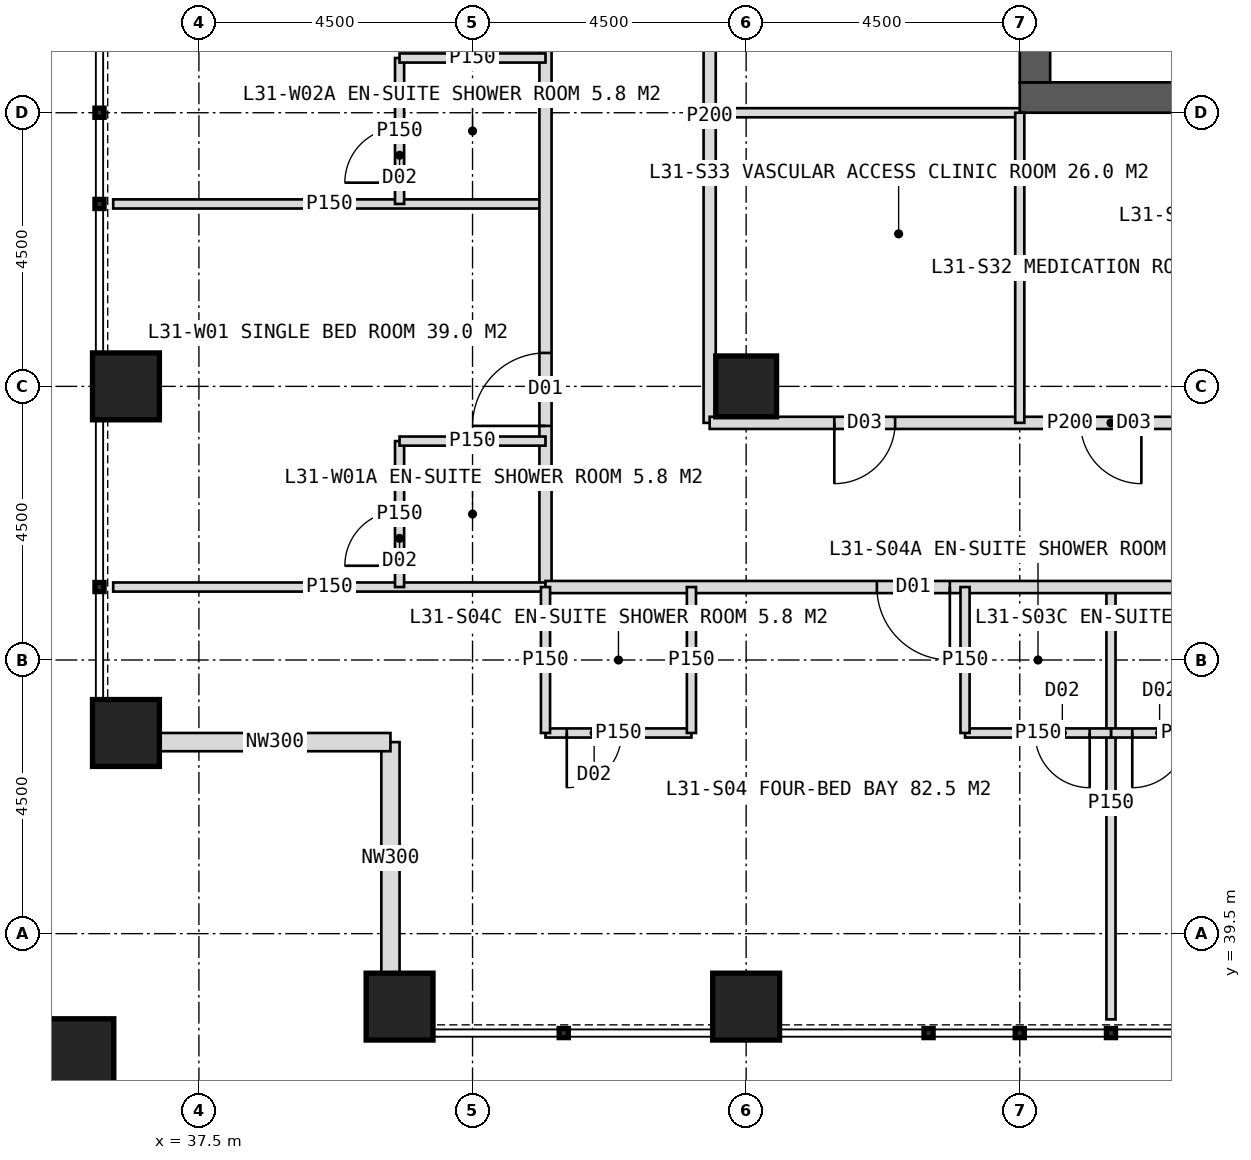
"""IFC4 building model, lengths in metres.
Left out: names, types, materials, properties, quantities, classifications, styles, units other than length and angle.
Written with IfcOpenShell. Run it as: python <this file> out.ifc"""

import sys

from ifc_helpers import new_model, si_unit, direction, frame, frame_2d, origin, origin_2d, place, context, subcontext, project, spatial, rectangle, hollow_rectangle, extrude, element, fill, save


model = new_model("IFC4")
c1 = context("Model", 3, precision=1e-05, world=origin(), true_north=direction((0.0, 1.0)))
c2 = subcontext(c1, "Body", "Model", "MODEL_VIEW")
j1 = project(units=[si_unit("LENGTHUNIT", "METRE"), si_unit("PLANEANGLEUNIT", "RADIAN")], contexts=[c1])
p1 = place(None, origin())
s1 = spatial("IfcSite", under=j1, at=p1, CompositionType="ELEMENT")
p2 = place(p1, origin())
s2 = spatial("IfcBuilding", under=s1, at=p2, CompositionType="ELEMENT")
p3 = place(p2, frame((0.0, 0.0, 132.0)))
s3 = spatial("IfcBuildingStorey", under=s2, at=p3, CompositionType="ELEMENT", Elevation=132.0)
p4 = place(p3, frame((51.0, 53.25, 0.0), z_axis=(0.0, 0.0, 1.0), x_axis=(1.0, 0.0, 0.0)))
e1 = element("IfcWall", 1, at=p4, inside=s3, PredefinedType="SHEAR", context=c2, shape_type="SweptSolid", body=[
    extrude(rectangle(XDim=18.0, YDim=0.5, at=frame_2d((9.0, 0.0))), origin(), (0.0, 0.0, 1.0), 4.0),
])
p5 = place(p4, frame((8.1, 0.0, 0.0)))
e2 = element("IfcOpeningElement", 2, at=p5, cuts=e1, PredefinedType="OPENING", context=c2, shape_type="SweptSolid", body=[
    extrude(rectangle(XDim=1.8, YDim=2.2, at=frame_2d((0.9, 1.1))), frame((0.0, 0.26, 0.0), z_axis=(0.0, -1.0, 0.0), x_axis=(1.0, 0.0, 0.0)), (0.0, 0.0, 1.0), 0.52),
])
p6 = place(p3, frame((51.25, 53.5, 0.0), z_axis=(0.0, 0.0, 1.0), x_axis=(0.0, 1.0, 0.0)))
e3 = element("IfcWall", 3, at=p6, inside=s3, PredefinedType="SHEAR", context=c2, shape_type="SweptSolid", body=[
    extrude(rectangle(XDim=17.0, YDim=0.5, at=frame_2d((8.5, 0.0))), origin(), (0.0, 0.0, 1.0), 4.0),
])
p7 = place(p6, frame((6.0, 0.0, 0.0)))
e4 = element("IfcOpeningElement", 4, at=p7, cuts=e3, PredefinedType="OPENING", context=c2, shape_type="SweptSolid", body=[
    extrude(rectangle(XDim=1.5, YDim=2.2, at=frame_2d((0.75, 1.1))), frame((0.0, 0.26, 0.0), z_axis=(0.0, -1.0, 0.0), x_axis=(1.0, 0.0, 0.0)), (0.0, 0.0, 1.0), 0.52),
])
p8 = place(p3, frame((46.5, 48.5, 0.0), z_axis=(0.0, 0.0, 1.0), x_axis=(1.0, 0.0, 0.0)))
e5 = element("IfcColumn", 5, at=p8, inside=s3, PredefinedType="COLUMN", context=c2, shape_type="SweptSolid", body=[
    extrude(hollow_rectangle(XDim=1.0, YDim=1.0, WallThickness=0.1, at=origin_2d()), origin(), (0.0, 0.0, 1.0), 4.0),
])
for number, where, z_axis, x_axis in (
    (6, (40.8, 38.3, 0.0), (0.0, 0.0, 1.0), (1.0, 0.0, 0.0)),
    (7, (36.3, 42.8, 0.0), (0.0, 0.0, 1.0), (1.0, 0.0, 0.0)),
    (8, (46.5, 38.3, 0.0), (0.0, 0.0, 1.0), (1.0, 0.0, 0.0)),
    (9, (36.3, 48.5, 0.0), (0.0, 0.0, 1.0), (1.0, 0.0, 0.0)),
):
    element("IfcColumn", number, at=place(p3, frame(where, z_axis=z_axis, x_axis=x_axis)), inside=s3, PredefinedType="COLUMN", context=c2, shape_type="SweptSolid", body=[
        extrude(hollow_rectangle(XDim=1.1, YDim=1.1, WallThickness=0.1, at=origin_2d()), origin(), (0.0, 0.0, 1.0), 4.0),
    ])
p9 = place(p3, frame((35.4, 37.4, 0.0), z_axis=(0.0, 0.0, 1.0), x_axis=(1.0, 0.0, 0.0)))
e10 = element("IfcColumn", 10, at=p9, inside=s3, PredefinedType="COLUMN", context=c2, shape_type="SweptSolid", body=[
    extrude(hollow_rectangle(XDim=1.4, YDim=1.4, WallThickness=0.08, at=origin_2d()), origin(), (0.0, 0.0, 1.0), 4.0),
])
for number, where, z_axis, x_axis in (
    (11, (40.65, 38.85, 0.0), (0.0, 0.0, 1.0), (0.0, 1.0, 0.0)),
    (12, (40.65, 42.65, 0.0), (0.0, 0.0, 1.0), (-1.0, 0.0, 0.0)),
):
    element("IfcWall", number, at=place(p3, frame(where, z_axis=z_axis, x_axis=x_axis)), inside=s3, PredefinedType="ELEMENTEDWALL", context=c2, shape_type="SweptSolid", body=[
        extrude(rectangle(XDim=3.8, YDim=0.3, at=frame_2d((1.9, 0.0))), origin(), (0.0, 0.0, 1.0), 4.0),
    ])
p10 = place(p3, frame((43.2, 51.5, 0.0), z_axis=(0.0, 0.0, 1.0), x_axis=(-1.0, 0.0, 0.0)))
e13 = element("IfcWall", 13, at=p10, inside=s3, PredefinedType="PARTITIONING", context=c2, shape_type="SweptSolid", body=[
    extrude(rectangle(XDim=7.11, YDim=0.15, at=frame_2d((3.555, 0.0))), origin(), (0.0, 0.0, 1.0), 3.75),
])
p11 = place(p3, frame((43.2, 45.2, 0.0), z_axis=(0.0, 0.0, 1.0), x_axis=(0.0, 1.0, 0.0)))
e14 = element("IfcWall", 14, at=p11, inside=s3, PredefinedType="PARTITIONING", context=c2, shape_type="SweptSolid", body=[
    extrude(rectangle(XDim=33.6, YDim=0.2, at=frame_2d((16.8, 0.0))), origin(), (0.0, 0.0, 1.0), 3.75),
])
p12 = place(p11, frame((2.65, 0.0, 0.0)))
e15 = element("IfcOpeningElement", 15, at=p12, cuts=e14, PredefinedType="OPENING", context=c2, shape_type="SweptSolid", body=[
    extrude(rectangle(XDim=1.2, YDim=2.2, at=frame_2d((0.6, 1.1))), frame((0.0, 0.11, 0.0), z_axis=(0.0, -1.0, 0.0), x_axis=(1.0, 0.0, 0.0)), (0.0, 0.0, 1.0), 0.22),
])
p13 = place(p11, frame((8.95, 0.0, 0.0)))
e16 = element("IfcOpeningElement", 16, at=p13, cuts=e14, PredefinedType="OPENING", context=c2, shape_type="SweptSolid", body=[
    extrude(rectangle(XDim=1.2, YDim=2.2, at=frame_2d((0.6, 1.1))), frame((0.0, 0.11, 0.0), z_axis=(0.0, -1.0, 0.0), x_axis=(1.0, 0.0, 0.0)), (0.0, 0.0, 1.0), 0.22),
])
p14 = place(p11, frame((19.45, 0.0, 0.0)))
e17 = element("IfcOpeningElement", 17, at=p14, cuts=e14, PredefinedType="OPENING", context=c2, shape_type="SweptSolid", body=[
    extrude(rectangle(XDim=1.2, YDim=2.2, at=frame_2d((0.6, 1.1))), frame((0.0, 0.11, 0.0), z_axis=(0.0, -1.0, 0.0), x_axis=(1.0, 0.0, 0.0)), (0.0, 0.0, 1.0), 0.22),
])
p15 = place(p11, frame((28.45, 0.0, 0.0)))
e18 = element("IfcOpeningElement", 18, at=p15, cuts=e14, PredefinedType="OPENING", context=c2, shape_type="SweptSolid", body=[
    extrude(rectangle(XDim=1.2, YDim=2.2, at=frame_2d((0.6, 1.1))), frame((0.0, 0.11, 0.0), z_axis=(0.0, -1.0, 0.0), x_axis=(1.0, 0.0, 0.0)), (0.0, 0.0, 1.0), 0.22),
])
p16 = place(p3, frame((43.2, 45.2, 0.0), z_axis=(0.0, 0.0, 1.0), x_axis=(-1.0, 0.0, 0.0)))
e19 = element("IfcWall", 19, at=p16, inside=s3, PredefinedType="PARTITIONING", context=c2, shape_type="SweptSolid", body=[
    extrude(rectangle(XDim=7.11, YDim=0.15, at=frame_2d((3.555, 0.0))), origin(), (0.0, 0.0, 1.0), 3.75),
])
p17 = place(p3, frame((40.8, 45.2, 0.0), z_axis=(0.0, 0.0, 1.0), x_axis=(0.0, 1.0, 0.0)))
e20 = element("IfcWall", 20, at=p17, inside=s3, PredefinedType="PARTITIONING", context=c2, shape_type="SweptSolid", body=[
    extrude(rectangle(XDim=2.4, YDim=0.15, at=frame_2d((1.2, 0.0))), origin(), (0.0, 0.0, 1.0), 2.997),
])
p18 = place(p17, frame((0.35, 0.0, 0.0)))
e21 = element("IfcOpeningElement", 21, at=p18, cuts=e20, PredefinedType="OPENING", context=c2, shape_type="SweptSolid", body=[
    extrude(rectangle(XDim=0.9, YDim=2.1, at=frame_2d((0.45, 1.05))), frame((0.0, 0.085, 0.0), z_axis=(0.0, -1.0, 0.0), x_axis=(1.0, 0.0, 0.0)), (0.0, 0.0, 1.0), 0.17),
])
p19 = place(p3, frame((43.2, 47.6, 0.0), z_axis=(0.0, 0.0, 1.0), x_axis=(-1.0, 0.0, 0.0)))
e22 = element("IfcWall", 22, at=p19, inside=s3, PredefinedType="PARTITIONING", context=c2, shape_type="SweptSolid", body=[
    extrude(rectangle(XDim=2.4, YDim=0.15, at=frame_2d((1.2, 0.0))), origin(), (0.0, 0.0, 1.0), 3.75),
])
p20 = place(p3, frame((40.8, 51.5, 0.0), z_axis=(0.0, 0.0, 1.0), x_axis=(0.0, 1.0, 0.0)))
e23 = element("IfcWall", 23, at=p20, inside=s3, PredefinedType="PARTITIONING", context=c2, shape_type="SweptSolid", body=[
    extrude(rectangle(XDim=2.4, YDim=0.15, at=frame_2d((1.2, 0.0))), origin(), (0.0, 0.0, 1.0), 3.75),
])
p21 = place(p20, frame((0.35, 0.0, 0.0)))
e24 = element("IfcOpeningElement", 24, at=p21, cuts=e23, PredefinedType="OPENING", context=c2, shape_type="SweptSolid", body=[
    extrude(rectangle(XDim=0.9, YDim=2.1, at=frame_2d((0.45, 1.05))), frame((0.0, 0.085, 0.0), z_axis=(0.0, -1.0, 0.0), x_axis=(1.0, 0.0, 0.0)), (0.0, 0.0, 1.0), 0.17),
])
p22 = place(p3, frame((43.2, 53.9, 0.0), z_axis=(0.0, 0.0, 1.0), x_axis=(-1.0, 0.0, 0.0)))
e25 = element("IfcWall", 25, at=p22, inside=s3, PredefinedType="PARTITIONING", context=c2, shape_type="SweptSolid", body=[
    extrude(rectangle(XDim=2.4, YDim=0.15, at=frame_2d((1.2, 0.0))), origin(), (0.0, 0.0, 1.0), 3.75),
])
p23 = place(p3, frame((51.0, 53.0, 0.0), z_axis=(0.0, 0.0, 1.0), x_axis=(-1.0, 0.0, 0.0)))
e26 = element("IfcWall", 26, at=p23, inside=s3, PredefinedType="PARTITIONING", context=c2, shape_type="SweptSolid", body=[
    extrude(rectangle(XDim=5.1, YDim=0.15, at=frame_2d((2.55, 0.0))), origin(), (0.0, 0.0, 1.0), 3.75),
])
p24 = place(p3, frame((45.9, 47.9, 0.0), z_axis=(0.0, 0.0, 1.0), x_axis=(0.0, 1.0, 0.0)))
e27 = element("IfcWall", 27, at=p24, inside=s3, PredefinedType="PARTITIONING", context=c2, shape_type="SweptSolid", body=[
    extrude(rectangle(XDim=10.1, YDim=0.2, at=frame_2d((5.05, 0.0))), origin(), (0.0, 0.0, 1.0), 3.75),
])
p25 = place(p24, frame((7.1, 0.0, 0.0)))
e28 = element("IfcOpeningElement", 28, at=p25, cuts=e27, PredefinedType="OPENING", context=c2, shape_type="SweptSolid", body=[
    extrude(rectangle(XDim=1.0, YDim=2.1, at=frame_2d((0.5, 1.05))), frame((0.0, 0.11, 0.0), z_axis=(0.0, -1.0, 0.0), x_axis=(1.0, 0.0, 0.0)), (0.0, 0.0, 1.0), 0.22),
])
p26 = place(p3, frame((52.5, 45.2, 0.0), z_axis=(0.0, 0.0, 1.0), x_axis=(0.0, -1.0, 0.0)))
e29 = element("IfcWall", 29, at=p26, inside=s3, PredefinedType="PARTITIONING", context=c2, shape_type="SweptSolid", body=[
    extrude(rectangle(XDim=7.11, YDim=0.15, at=frame_2d((3.555, 0.0))), origin(), (0.0, 0.0, 1.0), 3.75),
])
p27 = place(p3, frame((76.8, 45.2, 0.0), z_axis=(0.0, 0.0, 1.0), x_axis=(-1.0, 0.0, 0.0)))
e30 = element("IfcWall", 30, at=p27, inside=s3, PredefinedType="PARTITIONING", context=c2, shape_type="SweptSolid", body=[
    extrude(rectangle(XDim=33.6, YDim=0.2, at=frame_2d((16.8, 0.0))), origin(), (0.0, 0.0, 1.0), 3.75),
])
p28 = place(p27, frame((2.65, 0.0, 0.0)))
e31 = element("IfcOpeningElement", 31, at=p28, cuts=e30, PredefinedType="OPENING", context=c2, shape_type="SweptSolid", body=[
    extrude(rectangle(XDim=1.2, YDim=2.2, at=frame_2d((0.6, 1.1))), frame((0.0, 0.11, 0.0), z_axis=(0.0, -1.0, 0.0), x_axis=(1.0, 0.0, 0.0)), (0.0, 0.0, 1.0), 0.22),
])
p29 = place(p27, frame((11.05, 0.0, 0.0)))
e32 = element("IfcOpeningElement", 32, at=p29, cuts=e30, PredefinedType="OPENING", context=c2, shape_type="SweptSolid", body=[
    extrude(rectangle(XDim=1.2, YDim=2.2, at=frame_2d((0.6, 1.1))), frame((0.0, 0.11, 0.0), z_axis=(0.0, -1.0, 0.0), x_axis=(1.0, 0.0, 0.0)), (0.0, 0.0, 1.0), 0.22),
])
p30 = place(p27, frame((17.95, 0.0, 0.0)))
e33 = element("IfcOpeningElement", 33, at=p30, cuts=e30, PredefinedType="OPENING", context=c2, shape_type="SweptSolid", body=[
    extrude(rectangle(XDim=1.2, YDim=2.2, at=frame_2d((0.6, 1.1))), frame((0.0, 0.11, 0.0), z_axis=(0.0, -1.0, 0.0), x_axis=(1.0, 0.0, 0.0)), (0.0, 0.0, 1.0), 0.22),
])
p31 = place(p27, frame((26.95, 0.0, 0.0)))
e34 = element("IfcOpeningElement", 34, at=p31, cuts=e30, PredefinedType="OPENING", context=c2, shape_type="SweptSolid", body=[
    extrude(rectangle(XDim=1.2, YDim=2.2, at=frame_2d((0.6, 1.1))), frame((0.0, 0.11, 0.0), z_axis=(0.0, -1.0, 0.0), x_axis=(1.0, 0.0, 0.0)), (0.0, 0.0, 1.0), 0.22),
])
p32 = place(p3, frame((54.9, 42.8, 0.0), z_axis=(0.0, 0.0, 1.0), x_axis=(-1.0, 0.0, 0.0)))
e35 = element("IfcWall", 35, at=p32, inside=s3, PredefinedType="PARTITIONING", context=c2, shape_type="SweptSolid", body=[
    extrude(rectangle(XDim=2.4, YDim=0.15, at=frame_2d((1.2, 0.0))), origin(), (0.0, 0.0, 1.0), 3.75),
])
p33 = place(p32, frame((1.15, 0.0, 0.0)))
e36 = element("IfcOpeningElement", 36, at=p33, cuts=e35, PredefinedType="OPENING", context=c2, shape_type="SweptSolid", body=[
    extrude(rectangle(XDim=0.9, YDim=2.1, at=frame_2d((0.45, 1.05))), frame((0.0, 0.085, 0.0), z_axis=(0.0, -1.0, 0.0), x_axis=(1.0, 0.0, 0.0)), (0.0, 0.0, 1.0), 0.17),
])
p34 = place(p3, frame((52.5, 42.8, 0.0), z_axis=(0.0, 0.0, 1.0), x_axis=(-1.0, 0.0, 0.0)))
e37 = element("IfcWall", 37, at=p34, inside=s3, PredefinedType="PARTITIONING", context=c2, shape_type="SweptSolid", body=[
    extrude(rectangle(XDim=2.4, YDim=0.15, at=frame_2d((1.2, 0.0))), origin(), (0.0, 0.0, 1.0), 3.75),
])
p35 = place(p34, frame((0.35, 0.0, 0.0)))
e38 = element("IfcOpeningElement", 38, at=p35, cuts=e37, PredefinedType="OPENING", context=c2, shape_type="SweptSolid", body=[
    extrude(rectangle(XDim=0.9, YDim=2.1, at=frame_2d((0.45, 1.05))), frame((0.0, 0.085, 0.0), z_axis=(0.0, -1.0, 0.0), x_axis=(1.0, 0.0, 0.0)), (0.0, 0.0, 1.0), 0.17),
])
p36 = place(p3, frame((50.1, 45.2, 0.0), z_axis=(0.0, 0.0, 1.0), x_axis=(0.0, -1.0, 0.0)))
e39 = element("IfcWall", 39, at=p36, inside=s3, PredefinedType="PARTITIONING", context=c2, shape_type="SweptSolid", body=[
    extrude(rectangle(XDim=2.4, YDim=0.15, at=frame_2d((1.2, 0.0))), origin(), (0.0, 0.0, 1.0), 3.75),
])
p37 = place(p3, frame((45.6, 42.8, 0.0), z_axis=(0.0, 0.0, 1.0), x_axis=(-1.0, 0.0, 0.0)))
e40 = element("IfcWall", 40, at=p37, inside=s3, PredefinedType="PARTITIONING", context=c2, shape_type="SweptSolid", body=[
    extrude(rectangle(XDim=2.4, YDim=0.15, at=frame_2d((1.2, 0.0))), origin(), (0.0, 0.0, 1.0), 2.997),
])
p38 = place(p37, frame((1.15, 0.0, 0.0)))
e41 = element("IfcOpeningElement", 41, at=p38, cuts=e40, PredefinedType="OPENING", context=c2, shape_type="SweptSolid", body=[
    extrude(rectangle(XDim=0.9, YDim=2.1, at=frame_2d((0.45, 1.05))), frame((0.0, 0.085, 0.0), z_axis=(0.0, -1.0, 0.0), x_axis=(1.0, 0.0, 0.0)), (0.0, 0.0, 1.0), 0.17),
])
for number, where, z_axis, x_axis in (
    (42, (45.6, 45.2, 0.0), (0.0, 0.0, 1.0), (0.0, -1.0, 0.0)),
    (43, (43.2, 45.2, 0.0), (0.0, 0.0, 1.0), (0.0, -1.0, 0.0)),
):
    element("IfcWall", number, at=place(p3, frame(where, z_axis=z_axis, x_axis=x_axis)), inside=s3, PredefinedType="PARTITIONING", context=c2, shape_type="SweptSolid", body=[
        extrude(rectangle(XDim=2.4, YDim=0.15, at=frame_2d((1.2, 0.0))), origin(), (0.0, 0.0, 1.0), 3.75),
    ])
p39 = place(p3, frame((57.75, 47.9, 0.0), z_axis=(0.0, 0.0, 1.0), x_axis=(-1.0, 0.0, 0.0)))
e44 = element("IfcWall", 44, at=p39, inside=s3, PredefinedType="PARTITIONING", context=c2, shape_type="SweptSolid", body=[
    extrude(rectangle(XDim=11.85, YDim=0.2, at=frame_2d((5.925, 0.0))), origin(), (0.0, 0.0, 1.0), 3.75),
])
p40 = place(p39, frame((0.325, 0.0, 0.0)))
e45 = element("IfcOpeningElement", 45, at=p40, cuts=e44, PredefinedType="OPENING", context=c2, shape_type="SweptSolid", body=[
    extrude(rectangle(XDim=1.0, YDim=2.1, at=frame_2d((0.5, 1.05))), frame((0.0, 0.11, 0.0), z_axis=(0.0, -1.0, 0.0), x_axis=(1.0, 0.0, 0.0)), (0.0, 0.0, 1.0), 0.22),
])
p41 = place(p39, frame((4.75, 0.0, 0.0)))
e46 = element("IfcOpeningElement", 46, at=p41, cuts=e44, PredefinedType="OPENING", context=c2, shape_type="SweptSolid", body=[
    extrude(rectangle(XDim=1.0, YDim=2.1, at=frame_2d((0.5, 1.05))), frame((0.0, 0.11, 0.0), z_axis=(0.0, -1.0, 0.0), x_axis=(1.0, 0.0, 0.0)), (0.0, 0.0, 1.0), 0.22),
])
p42 = place(p39, frame((8.8, 0.0, 0.0)))
e47 = element("IfcOpeningElement", 47, at=p42, cuts=e44, PredefinedType="OPENING", context=c2, shape_type="SweptSolid", body=[
    extrude(rectangle(XDim=1.0, YDim=2.1, at=frame_2d((0.5, 1.05))), frame((0.0, 0.11, 0.0), z_axis=(0.0, -1.0, 0.0), x_axis=(1.0, 0.0, 0.0)), (0.0, 0.0, 1.0), 0.22),
])
p43 = place(p3, frame((51.0, 53.0, 0.0), z_axis=(0.0, 0.0, 1.0), x_axis=(0.0, -1.0, 0.0)))
e48 = element("IfcWall", 48, at=p43, inside=s3, PredefinedType="PARTITIONING", context=c2, shape_type="SweptSolid", body=[
    extrude(rectangle(XDim=5.1, YDim=0.15, at=frame_2d((2.55, 0.0))), origin(), (0.0, 0.0, 1.0), 3.75),
])
p44 = place(p12, origin())
e49 = element("IfcDoor", 49, at=p44, inside=s3, OperationType="SINGLE_SWING_LEFT", PredefinedType="DOOR", context=c2, shape_type="SweptSolid", body=[
    extrude(rectangle(XDim=1.2, YDim=2.2, at=frame_2d((0.6, 1.1))), frame((0.0, 0.025, 0.0), z_axis=(0.0, -1.0, 0.0), x_axis=(1.0, 0.0, 0.0)), (0.0, 0.0, 1.0), 0.05),
])
fill(e15, e49)
p45 = place(p18, origin())
e50 = element("IfcDoor", 50, at=p45, inside=s3, OperationType="SINGLE_SWING_LEFT", PredefinedType="DOOR", context=c2, shape_type="SweptSolid", body=[
    extrude(rectangle(XDim=0.9, YDim=2.1, at=frame_2d((0.45, 1.05))), frame((0.0, 0.025, 0.0), z_axis=(0.0, -1.0, 0.0), x_axis=(1.0, 0.0, 0.0)), (0.0, 0.0, 1.0), 0.05),
])
fill(e21, e50)
p46 = place(p21, origin())
e51 = element("IfcDoor", 51, at=p46, inside=s3, OperationType="SINGLE_SWING_LEFT", PredefinedType="DOOR", context=c2, shape_type="SweptSolid", body=[
    extrude(rectangle(XDim=0.9, YDim=2.1, at=frame_2d((0.45, 1.05))), frame((0.0, 0.025, 0.0), z_axis=(0.0, -1.0, 0.0), x_axis=(1.0, 0.0, 0.0)), (0.0, 0.0, 1.0), 0.05),
])
fill(e24, e51)
p47 = place(p33, origin())
e52 = element("IfcDoor", 52, at=p47, inside=s3, OperationType="SINGLE_SWING_RIGHT", PredefinedType="DOOR", context=c2, shape_type="SweptSolid", body=[
    extrude(rectangle(XDim=0.9, YDim=2.1, at=frame_2d((0.45, 1.05))), frame((0.0, 0.025, 0.0), z_axis=(0.0, -1.0, 0.0), x_axis=(1.0, 0.0, 0.0)), (0.0, 0.0, 1.0), 0.05),
])
fill(e36, e52)
p48 = place(p31, origin())
e53 = element("IfcDoor", 53, at=p48, inside=s3, OperationType="SINGLE_SWING_LEFT", PredefinedType="DOOR", context=c2, shape_type="SweptSolid", body=[
    extrude(rectangle(XDim=1.2, YDim=2.2, at=frame_2d((0.6, 1.1))), frame((0.0, 0.025, 0.0), z_axis=(0.0, -1.0, 0.0), x_axis=(1.0, 0.0, 0.0)), (0.0, 0.0, 1.0), 0.05),
])
fill(e34, e53)
p49 = place(p35, origin())
e54 = element("IfcDoor", 54, at=p49, inside=s3, OperationType="SINGLE_SWING_LEFT", PredefinedType="DOOR", context=c2, shape_type="SweptSolid", body=[
    extrude(rectangle(XDim=0.9, YDim=2.1, at=frame_2d((0.45, 1.05))), frame((0.0, 0.025, 0.0), z_axis=(0.0, -1.0, 0.0), x_axis=(1.0, 0.0, 0.0)), (0.0, 0.0, 1.0), 0.05),
])
fill(e38, e54)
p50 = place(p38, origin())
e55 = element("IfcDoor", 55, at=p50, inside=s3, OperationType="SINGLE_SWING_RIGHT", PredefinedType="DOOR", context=c2, shape_type="SweptSolid", body=[
    extrude(rectangle(XDim=0.9, YDim=2.1, at=frame_2d((0.45, 1.05))), frame((0.0, 0.025, 0.0), z_axis=(0.0, -1.0, 0.0), x_axis=(1.0, 0.0, 0.0)), (0.0, 0.0, 1.0), 0.05),
])
fill(e41, e55)
p51 = place(p41, origin())
e56 = element("IfcDoor", 56, at=p51, inside=s3, OperationType="SINGLE_SWING_LEFT", PredefinedType="DOOR", context=c2, shape_type="SweptSolid", body=[
    extrude(rectangle(XDim=1.0, YDim=2.1, at=frame_2d((0.5, 1.05))), frame((0.0, 0.025, 0.0), z_axis=(0.0, -1.0, 0.0), x_axis=(1.0, 0.0, 0.0)), (0.0, 0.0, 1.0), 0.05),
])
fill(e46, e56)
p52 = place(p42, origin())
e57 = element("IfcDoor", 57, at=p52, inside=s3, OperationType="SINGLE_SWING_RIGHT", PredefinedType="DOOR", context=c2, shape_type="SweptSolid", body=[
    extrude(rectangle(XDim=1.0, YDim=2.1, at=frame_2d((0.5, 1.05))), frame((0.0, 0.025, 0.0), z_axis=(0.0, -1.0, 0.0), x_axis=(1.0, 0.0, 0.0)), (0.0, 0.0, 1.0), 0.05),
])
fill(e47, e57)
save(model, sys.argv[1])
